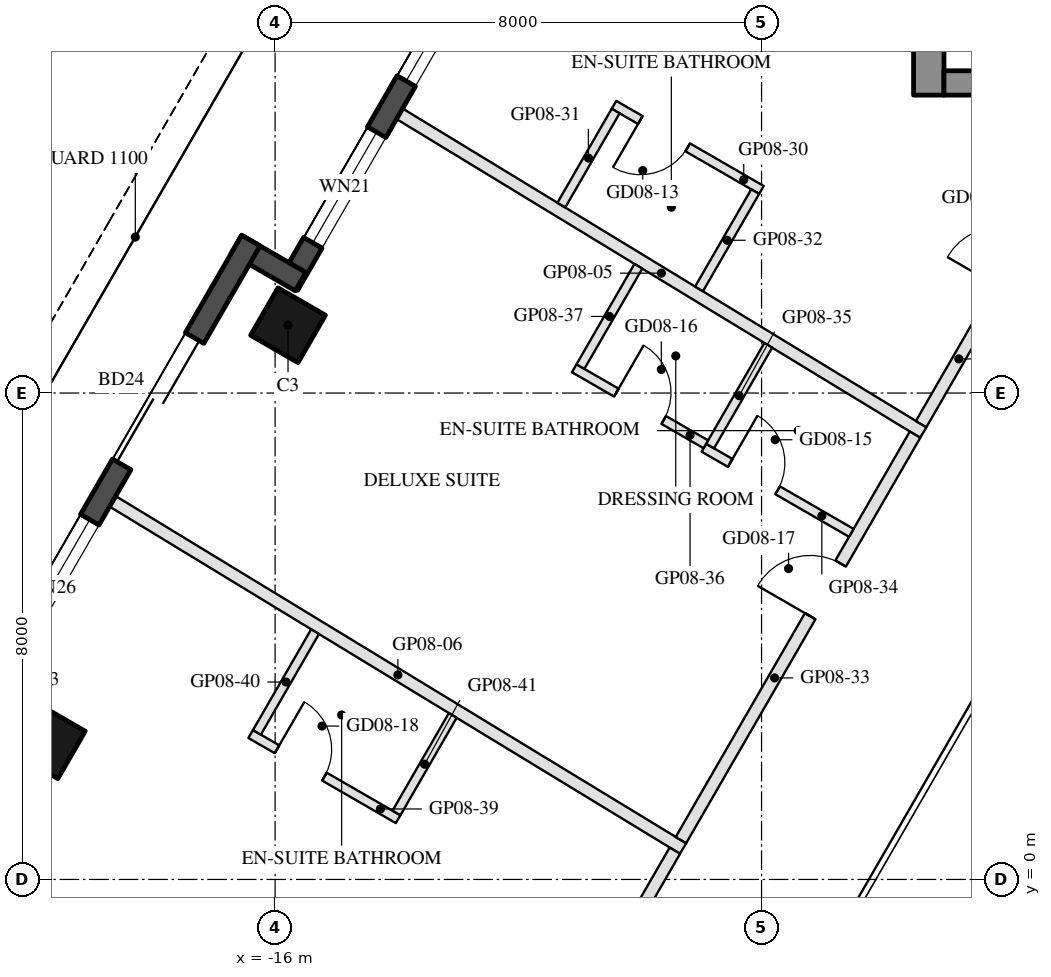
"""IFC4 building model, lengths in metres.
Left out: names, types, materials, properties, quantities, classifications, styles, units other than length and angle.
Written with IfcOpenShell. Run it as: python <this file> out.ifc"""

import sys

from ifc_helpers import new_model, si_unit, direction, frame, frame_2d, origin, origin_2d, place, context, subcontext, project, spatial, rectangle, hollow_rectangle, extrude, element, fill, save


model = new_model("IFC4")
c1 = context("Model", 3, precision=1e-05, world=origin(), true_north=direction((0.0, 1.0)))
c2 = subcontext(c1, "Body", "Model", "MODEL_VIEW")
j1 = project(units=[si_unit("LENGTHUNIT", "METRE"), si_unit("PLANEANGLEUNIT", "RADIAN")], contexts=[c1])
p1 = place(None, origin())
s1 = spatial("IfcSite", under=j1, at=p1, CompositionType="ELEMENT")
p2 = place(p1, origin())
s2 = spatial("IfcBuilding", under=s1, at=p2, CompositionType="ELEMENT")
p3 = place(p2, frame((0.0, 0.0, 102.0)))
s3 = spatial("IfcBuildingStorey", under=s2, at=p3, CompositionType="ELEMENT", Elevation=102.0)
for number, where, z_axis, x_axis in (
    (1, (-15.788, 9.115, 0.0), (0.0, 0.0, 1.0), (0.5, 0.866, 0.0)),
    (2, (-19.738, 2.273, 0.0), (0.0, 0.0, 1.0), (0.5, 0.866, 0.0)),
):
    element("IfcColumn", number, at=place(p3, frame(where, z_axis=z_axis, x_axis=x_axis)), inside=s3, PredefinedType="COLUMN", context=c2, shape_type="SweptSolid", body=[
        extrude(hollow_rectangle(XDim=0.9, YDim=0.9, WallThickness=0.04, at=origin_2d()), origin(), (0.0, 0.0, 1.0), 3.7),
    ])
p4 = place(p3, frame((-12.409, 15.617, 0.0), z_axis=(0.0, 0.0, 1.0), x_axis=(-0.500003597184, -0.866023326939, 0.0)))
e3 = element("IfcWall", 3, at=p4, inside=s3, PredefinedType="SOLIDWALL", context=c2, shape_type="SweptSolid", body=[
    extrude(rectangle(XDim=6.74, YDim=0.35, at=frame_2d((3.37, 0.0))), origin(), (0.0, 0.0, 1.0), 3.55),
])
p5 = place(p4, frame((0.77, 0.0, 0.3)))
e4 = element("IfcOpeningElement", 4, at=p5, cuts=e3, PredefinedType="OPENING", context=c2, shape_type="SweptSolid", body=[
    extrude(rectangle(XDim=2.1, YDim=2.65, at=frame_2d((1.05, 1.325))), frame((0.0, 0.185, 0.0), z_axis=(0.0, -1.0, 0.0), x_axis=(1.0, 0.0, 0.0)), (0.0, 0.0, 1.0), 0.37),
])
p6 = place(p4, frame((3.841, 0.0, 0.3)))
e5 = element("IfcOpeningElement", 5, at=p6, cuts=e3, PredefinedType="OPENING", context=c2, shape_type="SweptSolid", body=[
    extrude(rectangle(XDim=2.1, YDim=2.65, at=frame_2d((1.05, 1.325))), frame((0.0, 0.185, 0.0), z_axis=(0.0, -1.0, 0.0), x_axis=(1.0, 0.0, 0.0)), (0.0, 0.0, 1.0), 0.37),
])
p7 = place(p3, frame((-15.581, 9.833, 0.0), z_axis=(0.0, 0.0, 1.0), x_axis=(-0.866055662726, 0.499947586314, 0.0)))
e6 = element("IfcWall", 6, at=p7, inside=s3, PredefinedType="SOLIDWALL", context=c2, shape_type="SweptSolid", body=[
    extrude(rectangle(XDim=1.22, YDim=0.35, at=frame_2d((0.61, 0.0))), origin(), (0.0, 0.0, 1.0), 3.55),
])
p8 = place(p3, frame((-16.398, 10.507, 0.0), z_axis=(0.0, 0.0, 1.0), x_axis=(-0.499999142773, -0.866025898704, 0.0)))
e7 = element("IfcWall", 7, at=p8, inside=s3, PredefinedType="SOLIDWALL", context=c2, shape_type="SweptSolid", body=[
    extrude(rectangle(XDim=9.7, YDim=0.35, at=frame_2d((4.85, 0.0))), origin(), (0.0, 0.0, 1.0), 3.55),
])
p9 = place(p8, frame((1.85, 0.0, 0.0)))
e8 = element("IfcOpeningElement", 8, at=p9, cuts=e7, PredefinedType="OPENING", context=c2, shape_type="SweptSolid", body=[
    extrude(rectangle(XDim=2.4, YDim=2.4, at=frame_2d((1.2, 1.2))), frame((0.0, 0.185, 0.0), z_axis=(0.0, -1.0, 0.0), x_axis=(1.0, 0.0, 0.0)), (0.0, 0.0, 1.0), 0.37),
])
p10 = place(p8, frame((5.3, 0.0, 0.3)))
e9 = element("IfcOpeningElement", 9, at=p10, cuts=e7, PredefinedType="OPENING", context=c2, shape_type="SweptSolid", body=[
    extrude(rectangle(XDim=2.6, YDim=2.65, at=frame_2d((1.3, 1.325))), frame((0.0, 0.185, 0.0), z_axis=(0.0, -1.0, 0.0), x_axis=(1.0, 0.0, 0.0)), (0.0, 0.0, 1.0), 0.37),
])
p11 = place(p3, frame((-5.25, 12.9, 0.0), z_axis=(0.0, 0.0, 1.0), x_axis=(0.0, 1.0, 0.0)))
e10 = element("IfcWall", 10, at=p11, inside=s3, PredefinedType="SHEAR", context=c2, shape_type="SweptSolid", body=[
    extrude(rectangle(XDim=14.837, YDim=0.5, at=frame_2d((7.418, 0.0))), origin(), (0.0, 0.0, 1.0), 3.5),
])
p12 = place(p3, frame((5.0, 13.1, 0.0), z_axis=(0.0, 0.0, 1.0), x_axis=(-1.0, 0.0, 0.0)))
e11 = element("IfcWall", 11, at=p12, inside=s3, PredefinedType="SHEAR", context=c2, shape_type="SweptSolid", body=[
    extrude(rectangle(XDim=10.0, YDim=0.4, at=frame_2d((5.0, 0.0))), origin(), (0.0, 0.0, 1.0), 3.5),
])
p13 = place(p12, frame((3.55, 0.0, 0.0)))
e12 = element("IfcOpeningElement", 12, at=p13, cuts=e11, PredefinedType="OPENING", context=c2, shape_type="SweptSolid", body=[
    extrude(rectangle(XDim=1.1, YDim=2.1, at=frame_2d((0.55, 1.05))), frame((0.0, 0.21, 0.0), z_axis=(0.0, -1.0, 0.0), x_axis=(1.0, 0.0, 0.0)), (0.0, 0.0, 1.0), 0.42),
])
p14 = place(p12, frame((5.85, 0.0, 0.0)))
e13 = element("IfcOpeningElement", 13, at=p14, cuts=e11, PredefinedType="OPENING", context=c2, shape_type="SweptSolid", body=[
    extrude(rectangle(XDim=1.4, YDim=2.1, at=frame_2d((0.7, 1.05))), frame((0.0, 0.21, 0.0), z_axis=(0.0, -1.0, 0.0), x_axis=(1.0, 0.0, 0.0)), (0.0, 0.0, 1.0), 0.42),
])
p15 = place(p3, frame((-13.953, 12.593, 0.0), z_axis=(0.0, 0.0, 1.0), x_axis=(0.854198088033, -0.519947715065, 0.0)))
e14 = element("IfcWall", 14, at=p15, inside=s3, PredefinedType="PARTITIONING", context=c2, shape_type="SweptSolid", body=[
    extrude(rectangle(XDim=10.083, YDim=0.2, at=frame_2d((5.041, 0.0))), origin(), (0.0, 0.0, 1.0), 2.95),
])
p16 = place(p3, frame((-18.672, 6.219, 0.0), z_axis=(0.0, 0.0, 1.0), x_axis=(0.854207998877, -0.519931432647, 0.0)))
e15 = element("IfcWall", 15, at=p16, inside=s3, PredefinedType="PARTITIONING", context=c2, shape_type="SweptSolid", body=[
    extrude(rectangle(XDim=10.983, YDim=0.2, at=frame_2d((5.492, 0.0))), origin(), (0.0, 0.0, 1.0), 2.95),
])
p17 = place(p3, frame((-5.376, 7.489, 0.0), z_axis=(0.0, 0.0, 1.0), x_axis=(0.499998977725, 0.866025993994, 0.0)))
e16 = element("IfcWall", 16, at=p17, inside=s3, PredefinedType="PARTITIONING", context=c2, shape_type="SweptSolid", body=[
    extrude(rectangle(XDim=6.19, YDim=0.2, at=frame_2d((3.095, 0.0))), origin(), (0.0, 0.0, 1.0), 2.95),
])
p18 = place(p17, frame((2.595, 0.0, 0.0)))
e17 = element("IfcOpeningElement", 17, at=p18, cuts=e16, PredefinedType="OPENING", context=c2, shape_type="SweptSolid", body=[
    extrude(rectangle(XDim=1.0, YDim=2.1, at=frame_2d((0.5, 1.05))), frame((0.0, 0.11, 0.0), z_axis=(0.0, -1.0, 0.0), x_axis=(1.0, 0.0, 0.0)), (0.0, 0.0, 1.0), 0.22),
])
p19 = place(p3, frame((-8.002, 11.34, 0.0), z_axis=(0.0, 0.0, 1.0), x_axis=(-0.865996816683, 0.500049511043, 0.0)))
e18 = element("IfcWall", 18, at=p19, inside=s3, PredefinedType="PARTITIONING", context=c2, shape_type="SweptSolid", body=[
    extrude(rectangle(XDim=2.8, YDim=0.15, at=frame_2d((1.4, 0.0))), origin(), (0.0, 0.0, 1.0), 3.55),
])
p20 = place(p19, frame((1.4, 0.0, 0.0)))
e19 = element("IfcOpeningElement", 19, at=p20, cuts=e18, PredefinedType="OPENING", context=c2, shape_type="SweptSolid", body=[
    extrude(rectangle(XDim=0.9, YDim=2.1, at=frame_2d((0.45, 1.05))), frame((0.0, 0.085, 0.0), z_axis=(0.0, -1.0, 0.0), x_axis=(1.0, 0.0, 0.0)), (0.0, 0.0, 1.0), 0.17),
])
p21 = place(p3, frame((-10.399, 12.638, 0.0), z_axis=(0.0, 0.0, 1.0), x_axis=(-0.499974788625, -0.866039959089, 0.0)))
e20 = element("IfcWall", 20, at=p21, inside=s3, PredefinedType="PARTITIONING", context=c2, shape_type="SweptSolid", body=[
    extrude(rectangle(XDim=1.787, YDim=0.15, at=frame_2d((0.893, 0.0))), origin(), (0.0, 0.0, 1.0), 2.95),
])
p22 = place(p3, frame((-8.104, 11.313, 0.0), z_axis=(0.0, 0.0, 1.0), x_axis=(-0.499989263917, -0.866031602176, 0.0)))
e21 = element("IfcWall", 21, at=p22, inside=s3, PredefinedType="PARTITIONING", context=c2, shape_type="SweptSolid", body=[
    extrude(rectangle(XDim=1.848, YDim=0.15, at=frame_2d((0.924, 0.0))), origin(), (0.0, 0.0, 1.0), 2.95),
])
p23 = place(p3, frame((-9.326, 0.647, 0.0), z_axis=(0.0, 0.0, 1.0), x_axis=(0.499982277793, 0.866035635464, 0.0)))
e22 = element("IfcWall", 22, at=p23, inside=s3, PredefinedType="PARTITIONING", context=c2, shape_type="SweptSolid", body=[
    extrude(rectangle(XDim=7.7, YDim=0.2, at=frame_2d((3.85, 0.0))), origin(), (0.0, 0.0, 1.0), 2.95),
])
p24 = place(p23, frame((4.252, 0.0, 0.0)))
e23 = element("IfcOpeningElement", 23, at=p24, cuts=e22, PredefinedType="OPENING", context=c2, shape_type="SweptSolid", body=[
    extrude(rectangle(XDim=1.0, YDim=2.1, at=frame_2d((0.5, 1.05))), frame((0.0, 0.11, 0.0), z_axis=(0.0, -1.0, 0.0), x_axis=(1.0, 0.0, 0.0)), (0.0, 0.0, 1.0), 0.22),
])
p25 = place(p3, frame((-8.948, 7.101, 0.0), z_axis=(0.0, 0.0, 1.0), x_axis=(0.866034573852, -0.49998411664, 0.0)))
e24 = element("IfcWall", 24, at=p25, inside=s3, PredefinedType="PARTITIONING", context=c2, shape_type="SweptSolid", body=[
    extrude(rectangle(XDim=2.8, YDim=0.15, at=frame_2d((1.4, 0.0))), origin(), (0.0, 0.0, 1.0), 3.55),
])
p26 = place(p25, frame((0.5, 0.0, 0.0)))
e25 = element("IfcOpeningElement", 25, at=p26, cuts=e24, PredefinedType="OPENING", context=c2, shape_type="SweptSolid", body=[
    extrude(rectangle(XDim=0.9, YDim=2.1, at=frame_2d((0.45, 1.05))), frame((0.0, 0.085, 0.0), z_axis=(0.0, -1.0, 0.0), x_axis=(1.0, 0.0, 0.0)), (0.0, 0.0, 1.0), 0.17),
])
p27 = place(p3, frame((-7.89, 8.785, 0.0), z_axis=(0.0, 0.0, 1.0), x_axis=(-0.499954417993, -0.866051718969, 0.0)))
e26 = element("IfcWall", 26, at=p27, inside=s3, PredefinedType="PARTITIONING", context=c2, shape_type="SweptSolid", body=[
    extrude(rectangle(XDim=1.913, YDim=0.15, at=frame_2d((0.957, 0.0))), origin(), (0.0, 0.0, 1.0), 3.55),
])
p28 = place(p3, frame((-11.081, 8.407, 0.0), z_axis=(0.0, 0.0, 1.0), x_axis=(0.866047370643, -0.499961950354, 0.0)))
e27 = element("IfcWall", 27, at=p28, inside=s3, PredefinedType="PARTITIONING", context=c2, shape_type="SweptSolid", body=[
    extrude(rectangle(XDim=2.5, YDim=0.15, at=frame_2d((1.25, 0.0))), origin(), (0.0, 0.0, 1.0), 3.55),
])
p29 = place(p28, frame((0.8, 0.0, 0.0)))
e28 = element("IfcOpeningElement", 28, at=p29, cuts=e27, PredefinedType="OPENING", context=c2, shape_type="SweptSolid", body=[
    extrude(rectangle(XDim=0.9, YDim=2.1, at=frame_2d((0.45, 1.05))), frame((0.0, 0.085, 0.0), z_axis=(0.0, -1.0, 0.0), x_axis=(1.0, 0.0, 0.0)), (0.0, 0.0, 1.0), 0.17),
])
p30 = place(p3, frame((-10.026, 10.085, 0.0), z_axis=(0.0, 0.0, 1.0), x_axis=(-0.49999591573, -0.866027761826, 0.0)))
e29 = element("IfcWall", 29, at=p30, inside=s3, PredefinedType="PARTITIONING", context=c2, shape_type="SweptSolid", body=[
    extrude(rectangle(XDim=1.906, YDim=0.15, at=frame_2d((0.953, 0.0))), origin(), (0.0, 0.0, 1.0), 3.55),
])
p31 = place(p3, frame((-12.269, -4.45, 0.0), z_axis=(0.0, 0.0, 1.0), x_axis=(0.50001360338, 0.866017549727, 0.0)))
e30 = element("IfcWall", 30, at=p31, inside=s3, PredefinedType="PARTITIONING", context=c2, shape_type="SweptSolid", body=[
    extrude(rectangle(XDim=5.686, YDim=0.2, at=frame_2d((2.843, 0.0))), origin(), (0.0, 0.0, 1.0), 2.95),
])
p32 = place(p31, frame((2.343, 0.0, 0.0)))
e31 = element("IfcOpeningElement", 31, at=p32, cuts=e30, PredefinedType="OPENING", context=c2, shape_type="SweptSolid", body=[
    extrude(rectangle(XDim=1.0, YDim=2.1, at=frame_2d((0.5, 1.05))), frame((0.0, 0.11, 0.0), z_axis=(0.0, -1.0, 0.0), x_axis=(1.0, 0.0, 0.0)), (0.0, 0.0, 1.0), 0.22),
])
p33 = place(p3, frame((-16.402, 2.391, 0.0), z_axis=(0.0, 0.0, 1.0), x_axis=(0.866018616679, -0.500011755427, 0.0)))
e32 = element("IfcWall", 32, at=p33, inside=s3, PredefinedType="PARTITIONING", context=c2, shape_type="SweptSolid", body=[
    extrude(rectangle(XDim=2.8, YDim=0.15, at=frame_2d((1.4, 0.0))), origin(), (0.0, 0.0, 1.0), 3.55),
])
p34 = place(p33, frame((0.5, 0.0, 0.0)))
e33 = element("IfcOpeningElement", 33, at=p34, cuts=e32, PredefinedType="OPENING", context=c2, shape_type="SweptSolid", body=[
    extrude(rectangle(XDim=0.9, YDim=2.1, at=frame_2d((0.45, 1.05))), frame((0.0, 0.085, 0.0), z_axis=(0.0, -1.0, 0.0), x_axis=(1.0, 0.0, 0.0)), (0.0, 0.0, 1.0), 0.17),
])
p35 = place(p3, frame((-15.343, 4.076, 0.0), z_axis=(0.0, 0.0, 1.0), x_axis=(-0.499954417993, -0.866051718969, 0.0)))
e34 = element("IfcWall", 34, at=p35, inside=s3, PredefinedType="PARTITIONING", context=c2, shape_type="SweptSolid", body=[
    extrude(rectangle(XDim=1.913, YDim=0.15, at=frame_2d((0.957, 0.0))), origin(), (0.0, 0.0, 1.0), 3.55),
])
p36 = place(p3, frame((-13.079, 2.698, 0.0), z_axis=(0.0, 0.0, 1.0), x_axis=(-0.499939294285, -0.866060449409, 0.0)))
e35 = element("IfcWall", 35, at=p36, inside=s3, PredefinedType="PARTITIONING", context=c2, shape_type="SweptSolid", body=[
    extrude(rectangle(XDim=1.852, YDim=0.15, at=frame_2d((0.926, 0.0))), origin(), (0.0, 0.0, 1.0), 3.55),
])
p37 = place(p5, origin())
e36 = element("IfcWindow", 36, at=p37, inside=s3, PartitioningType="SINGLE_PANEL", PredefinedType="WINDOW", context=c2, shape_type="SweptSolid", body=[
    extrude(rectangle(XDim=2.1, YDim=2.65, at=frame_2d((1.05, 1.325))), frame((0.0, 0.03, 0.0), z_axis=(0.0, -1.0, 0.0), x_axis=(1.0, 0.0, 0.0)), (0.0, 0.0, 1.0), 0.06),
])
fill(e4, e36)
p38 = place(p6, origin())
e37 = element("IfcWindow", 37, at=p38, inside=s3, PartitioningType="SINGLE_PANEL", PredefinedType="WINDOW", context=c2, shape_type="SweptSolid", body=[
    extrude(rectangle(XDim=2.1, YDim=2.65, at=frame_2d((1.05, 1.325))), frame((0.0, 0.03, 0.0), z_axis=(0.0, -1.0, 0.0), x_axis=(1.0, 0.0, 0.0)), (0.0, 0.0, 1.0), 0.06),
])
fill(e5, e37)
p39 = place(p9, frame((2.4, 0.0, 0.0), z_axis=(0.0, 0.0, 1.0), x_axis=(-1.0, 0.0, 0.0)))
e38 = element("IfcDoor", 38, at=p39, inside=s3, OperationType="SLIDING_TO_LEFT", PredefinedType="DOOR", context=c2, shape_type="SweptSolid", body=[
    extrude(rectangle(XDim=2.4, YDim=2.4, at=frame_2d((1.2, 1.2))), frame((0.0, 0.025, 0.0), z_axis=(0.0, -1.0, 0.0), x_axis=(1.0, 0.0, 0.0)), (0.0, 0.0, 1.0), 0.05),
])
fill(e8, e38)
p40 = place(p10, origin())
e39 = element("IfcWindow", 39, at=p40, inside=s3, PartitioningType="SINGLE_PANEL", PredefinedType="WINDOW", context=c2, shape_type="SweptSolid", body=[
    extrude(rectangle(XDim=2.6, YDim=2.65, at=frame_2d((1.3, 1.325))), frame((0.0, 0.03, 0.0), z_axis=(0.0, -1.0, 0.0), x_axis=(1.0, 0.0, 0.0)), (0.0, 0.0, 1.0), 0.06),
])
fill(e9, e39)
p41 = place(p20, origin())
e40 = element("IfcDoor", 40, at=p41, inside=s3, OperationType="SINGLE_SWING_RIGHT", PredefinedType="DOOR", context=c2, shape_type="SweptSolid", body=[
    extrude(rectangle(XDim=0.9, YDim=2.1, at=frame_2d((0.45, 1.05))), frame((0.0, 0.025, 0.0), z_axis=(0.0, -1.0, 0.0), x_axis=(1.0, 0.0, 0.0)), (0.0, 0.0, 1.0), 0.05),
])
fill(e19, e40)
p42 = place(p26, origin())
e41 = element("IfcDoor", 41, at=p42, inside=s3, OperationType="SINGLE_SWING_LEFT", PredefinedType="DOOR", context=c2, shape_type="SweptSolid", body=[
    extrude(rectangle(XDim=0.9, YDim=2.1, at=frame_2d((0.45, 1.05))), frame((0.0, 0.025, 0.0), z_axis=(0.0, -1.0, 0.0), x_axis=(1.0, 0.0, 0.0)), (0.0, 0.0, 1.0), 0.05),
])
fill(e25, e41)
p43 = place(p29, origin())
e42 = element("IfcDoor", 42, at=p43, inside=s3, OperationType="SINGLE_SWING_LEFT", PredefinedType="DOOR", context=c2, shape_type="SweptSolid", body=[
    extrude(rectangle(XDim=0.9, YDim=2.1, at=frame_2d((0.45, 1.05))), frame((0.0, 0.025, 0.0), z_axis=(0.0, -1.0, 0.0), x_axis=(1.0, 0.0, 0.0)), (0.0, 0.0, 1.0), 0.05),
])
fill(e28, e42)
p44 = place(p24, origin())
e43 = element("IfcDoor", 43, at=p44, inside=s3, OperationType="SINGLE_SWING_LEFT", PredefinedType="DOOR", context=c2, shape_type="SweptSolid", body=[
    extrude(rectangle(XDim=1.0, YDim=2.1, at=frame_2d((0.5, 1.05))), frame((0.0, 0.025, 0.0), z_axis=(0.0, -1.0, 0.0), x_axis=(1.0, 0.0, 0.0)), (0.0, 0.0, 1.0), 0.05),
])
fill(e23, e43)
p45 = place(p34, origin())
e44 = element("IfcDoor", 44, at=p45, inside=s3, OperationType="SINGLE_SWING_LEFT", PredefinedType="DOOR", context=c2, shape_type="SweptSolid", body=[
    extrude(rectangle(XDim=0.9, YDim=2.1, at=frame_2d((0.45, 1.05))), frame((0.0, 0.025, 0.0), z_axis=(0.0, -1.0, 0.0), x_axis=(1.0, 0.0, 0.0)), (0.0, 0.0, 1.0), 0.05),
])
fill(e33, e44)
save(model, sys.argv[1])
